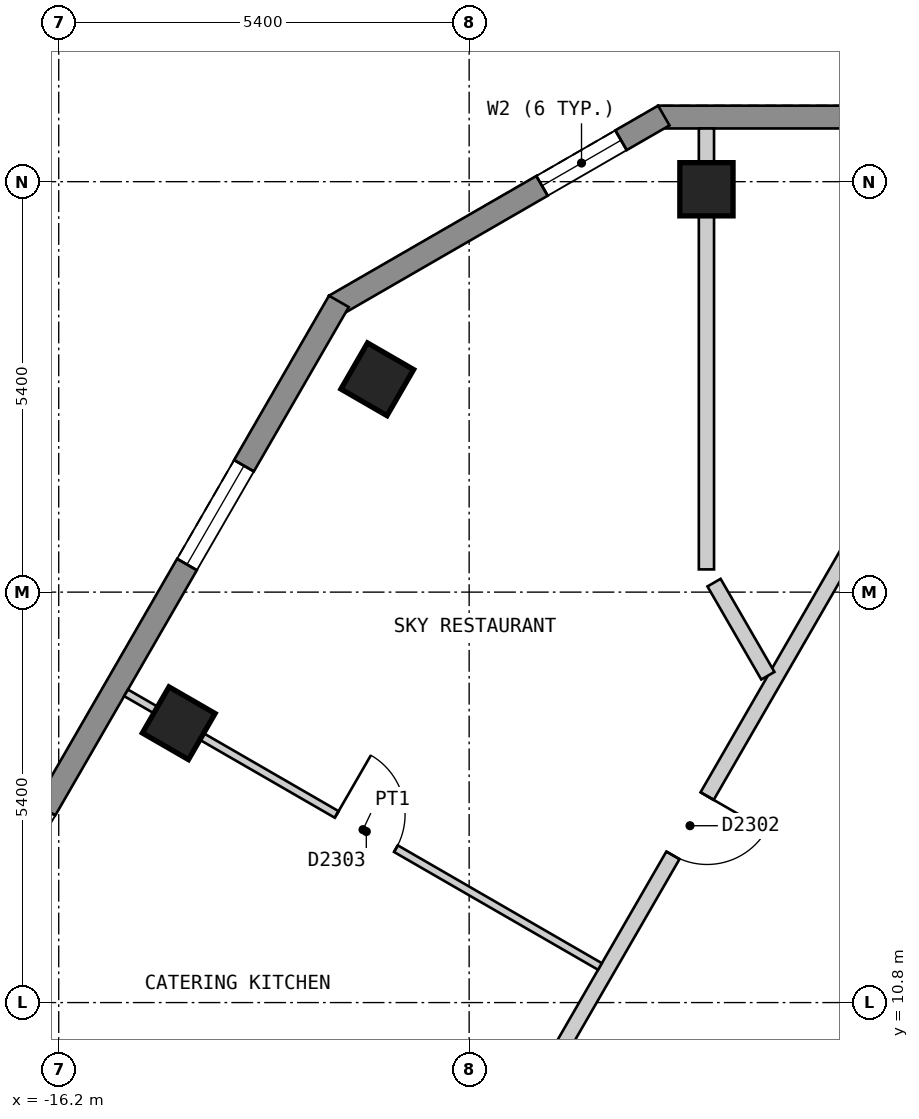
"""IFC4 building model, lengths in metres.
Left out: names, types, materials, properties, quantities, classifications, styles, units other than length and angle.
Written with IfcOpenShell. Run it as: python <this file> out.ifc"""

import sys

from ifc_helpers import new_model, si_unit, direction, frame, frame_2d, origin, origin_2d, place, context, subcontext, project, spatial, polyline, rectangle, outline, extrude, element, fill, save


model = new_model("IFC4")
c1 = context("Model", 3, precision=1e-05, world=origin(), true_north=direction((0.0, 1.0)))
c2 = subcontext(c1, "Body", "Model", "MODEL_VIEW")
j1 = project(units=[si_unit("LENGTHUNIT", "METRE"), si_unit("PLANEANGLEUNIT", "RADIAN")], contexts=[c1])
p1 = place(None, origin())
s1 = spatial("IfcSite", under=j1, at=p1, CompositionType="ELEMENT")
p2 = place(p1, origin())
s2 = spatial("IfcBuilding", under=s1, at=p2, CompositionType="ELEMENT")
p3 = place(p2, frame((0.0, 0.0, 241.8)))
s3 = spatial("IfcBuildingStorey", under=s2, at=p3, CompositionType="ELEMENT", Elevation=241.8)
for number, where, z_axis, x_axis in (
    (1, (-7.678, 21.5, 0.0), (0.0, 0.0, 1.0), (-1.0, 0.0, 0.0)),
    (2, (-12.009, 19.0, 0.0), (0.0, 0.0, 1.0), (-0.5, -0.866, 0.0)),
    (3, (-14.621, 14.475, 0.0), (0.0, 0.0, 1.0), (-0.5, -0.866, 0.0)),
):
    element("IfcColumn", number, at=place(p3, frame(where, z_axis=z_axis, x_axis=x_axis)), inside=s3, PredefinedType="COLUMN", context=c2, shape_type="SweptSolid", body=[
        extrude(rectangle(XDim=0.7, YDim=0.7, at=origin_2d()), origin(), (0.0, 0.0, 1.0), 3.0),
    ])
p4 = place(p3, frame((8.314, 22.45, 0.0), z_axis=(0.0, 0.0, 1.0), x_axis=(-1.0, 0.0, 0.0)))
e4 = element("IfcWall", 4, at=p4, inside=s3, PredefinedType="SOLIDWALL", context=c2, shape_type="SweptSolid", body=[
    extrude(outline(polyline([(0.0, -0.15), (16.628, -0.15), (16.548, 0.15), (0.08, 0.15), (0.0, -0.15)])), origin(), (0.0, 0.0, 1.0), 2.2),
])
p5 = place(p4, frame((2.444, 0.0, 0.15)))
e5 = element("IfcOpeningElement", 5, at=p5, cuts=e4, PredefinedType="OPENING", context=c2, shape_type="SweptSolid", body=[
    extrude(rectangle(XDim=1.5, YDim=2.1, at=frame_2d((0.75, 1.05))), frame((0.0, 0.16, 0.0), z_axis=(0.0, -1.0, 0.0), x_axis=(1.0, 0.0, 0.0)), (0.0, 0.0, 1.0), 0.32),
])
p6 = place(p4, frame((7.564, 0.0, 0.15)))
e6 = element("IfcOpeningElement", 6, at=p6, cuts=e4, PredefinedType="OPENING", context=c2, shape_type="SweptSolid", body=[
    extrude(rectangle(XDim=1.5, YDim=2.1, at=frame_2d((0.75, 1.05))), frame((0.0, 0.16, 0.0), z_axis=(0.0, -1.0, 0.0), x_axis=(1.0, 0.0, 0.0)), (0.0, 0.0, 1.0), 0.32),
])
p7 = place(p4, frame((12.683, 0.0, 0.15)))
e7 = element("IfcOpeningElement", 7, at=p7, cuts=e4, PredefinedType="OPENING", context=c2, shape_type="SweptSolid", body=[
    extrude(rectangle(XDim=1.5, YDim=2.1, at=frame_2d((0.75, 1.05))), frame((0.0, 0.16, 0.0), z_axis=(0.0, -1.0, 0.0), x_axis=(1.0, 0.0, 0.0)), (0.0, 0.0, 1.0), 0.32),
])
p8 = place(p3, frame((-8.239, 22.47, 0.0), z_axis=(0.0, 0.0, 1.0), x_axis=(-0.866022959057, -0.500004234368, 0.0)))
e8 = element("IfcWall", 8, at=p8, inside=s3, PredefinedType="SOLIDWALL", context=c2, shape_type="SweptSolid", body=[
    extrude(outline(polyline([(0.0, -0.15), (5.0, -0.15), (4.92, 0.15), (0.08, 0.15), (0.0, -0.15)])), origin(), (0.0, 0.0, 1.0), 2.2),
])
p9 = place(p8, frame((0.65, 0.0, 0.15)))
e9 = element("IfcOpeningElement", 9, at=p9, cuts=e8, PredefinedType="OPENING", context=c2, shape_type="SweptSolid", body=[
    extrude(rectangle(XDim=1.2, YDim=2.1, at=frame_2d((0.6, 1.05))), frame((0.0, 0.16, 0.0), z_axis=(0.0, -1.0, 0.0), x_axis=(1.0, 0.0, 0.0)), (0.0, 0.0, 1.0), 0.32),
])
p10 = place(p3, frame((-12.514, 20.025, 0.0), z_axis=(0.0, 0.0, 1.0), x_axis=(-0.500003656944, -0.866023292436, 0.0)))
e10 = element("IfcWall", 10, at=p10, inside=s3, PredefinedType="SOLIDWALL", context=c2, shape_type="SweptSolid", body=[
    extrude(outline(polyline([(0.0, -0.15), (22.17, -0.15), (22.09, 0.15), (0.08, 0.15), (0.0, -0.15)])), origin(), (0.0, 0.0, 1.0), 2.2),
])
p11 = place(p10, frame((2.497, 0.0, 0.15)))
e11 = element("IfcOpeningElement", 11, at=p11, cuts=e10, PredefinedType="OPENING", context=c2, shape_type="SweptSolid", body=[
    extrude(rectangle(XDim=1.5, YDim=2.1, at=frame_2d((0.75, 1.05))), frame((0.0, 0.16, 0.0), z_axis=(0.0, -1.0, 0.0), x_axis=(1.0, 0.0, 0.0)), (0.0, 0.0, 1.0), 0.32),
])
p12 = place(p10, frame((7.722, 0.0, 0.15)))
e12 = element("IfcOpeningElement", 12, at=p12, cuts=e10, PredefinedType="OPENING", context=c2, shape_type="SweptSolid", body=[
    extrude(rectangle(XDim=1.5, YDim=2.1, at=frame_2d((0.75, 1.05))), frame((0.0, 0.16, 0.0), z_axis=(0.0, -1.0, 0.0), x_axis=(1.0, 0.0, 0.0)), (0.0, 0.0, 1.0), 0.32),
])
p13 = place(p10, frame((12.948, 0.0, 0.15)))
e13 = element("IfcOpeningElement", 13, at=p13, cuts=e10, PredefinedType="OPENING", context=c2, shape_type="SweptSolid", body=[
    extrude(rectangle(XDim=1.5, YDim=2.1, at=frame_2d((0.75, 1.05))), frame((0.0, 0.16, 0.0), z_axis=(0.0, -1.0, 0.0), x_axis=(1.0, 0.0, 0.0)), (0.0, 0.0, 1.0), 0.32),
])
p14 = place(p10, frame((18.173, 0.0, 0.15)))
e14 = element("IfcOpeningElement", 14, at=p14, cuts=e10, PredefinedType="OPENING", context=c2, shape_type="SweptSolid", body=[
    extrude(rectangle(XDim=1.5, YDim=2.1, at=frame_2d((0.75, 1.05))), frame((0.0, 0.16, 0.0), z_axis=(0.0, -1.0, 0.0), x_axis=(1.0, 0.0, 0.0)), (0.0, 0.0, 1.0), 0.32),
])
p15 = place(p3, frame((-10.854, 8.0, 0.0), z_axis=(0.0, 0.0, 1.0), x_axis=(0.499997637144, 0.866026767976, 0.0)))
e15 = element("IfcWall", 15, at=p15, inside=s3, PredefinedType="PARTITIONING", context=c2, shape_type="SweptSolid", body=[
    extrude(rectangle(XDim=10.854, YDim=0.2, at=frame_2d((5.427, 0.0))), origin(), (0.0, 0.0, 1.0), 2.2),
])
p16 = place(p15, frame((5.47, 0.0, 0.0)))
e16 = element("IfcOpeningElement", 16, at=p16, cuts=e15, PredefinedType="OPENING", context=c2, shape_type="SweptSolid", body=[
    extrude(rectangle(XDim=0.9, YDim=2.1, at=frame_2d((0.45, 1.05))), frame((0.0, 0.11, 0.0), z_axis=(0.0, -1.0, 0.0), x_axis=(1.0, 0.0, 0.0)), (0.0, 0.0, 1.0), 0.22),
])
p17 = place(p3, frame((-15.314, 14.875, 0.0), z_axis=(0.0, 0.0, 1.0), x_axis=(0.866001485781, -0.500041424909, 0.0)))
e17 = element("IfcWall", 17, at=p17, inside=s3, PredefinedType="PARTITIONING", context=c2, shape_type="SweptSolid", body=[
    extrude(rectangle(XDim=7.2, YDim=0.1, at=frame_2d((3.6, 0.0))), origin(), (0.0, 0.0, 1.0), 2.2),
])
p18 = place(p17, frame((3.2, 0.0, 0.0)))
e18 = element("IfcOpeningElement", 18, at=p18, cuts=e17, PredefinedType="OPENING", context=c2, shape_type="SweptSolid", body=[
    extrude(rectangle(XDim=0.9, YDim=2.1, at=frame_2d((0.45, 1.05))), frame((0.0, 0.06, 0.0), z_axis=(0.0, -1.0, 0.0), x_axis=(1.0, 0.0, 0.0)), (0.0, 0.0, 1.0), 0.12),
])
p19 = place(p3, frame((-7.578, 16.325, 0.0), z_axis=(0.0, 0.0, 1.0), x_axis=(0.500314976313, -0.865843475737, 0.0)))
e19 = element("IfcWall", 19, at=p19, inside=s3, PredefinedType="PARTITIONING", context=c2, shape_type="SweptSolid", body=[
    extrude(rectangle(XDim=1.415, YDim=0.2, at=frame_2d((0.707, 0.0))), origin(), (0.0, 0.0, 1.0), 2.2),
])
p20 = place(p3, frame((-17.926, 10.35, 0.0), z_axis=(0.0, 0.0, 1.0), x_axis=(0.866018411306, -0.500012111133, 0.0)))
e20 = element("IfcWall", 20, at=p20, inside=s3, PredefinedType="PARTITIONING", context=c2, shape_type="SweptSolid", body=[
    extrude(rectangle(XDim=9.898, YDim=0.2, at=frame_2d((4.949, 0.0))), origin(), (0.0, 0.0, 1.0), 2.2),
])
p21 = place(p3, frame((-7.678, 16.499, 0.0), z_axis=(0.0, 0.0, 1.0), x_axis=(0.0, 1.0, 0.0)))
e21 = element("IfcWall", 21, at=p21, inside=s3, PredefinedType="PARTITIONING", context=c2, shape_type="SweptSolid", body=[
    extrude(rectangle(XDim=5.801, YDim=0.2, at=frame_2d((2.9, 0.0))), origin(), (0.0, 0.0, 1.0), 2.2),
])
p22 = place(p9, origin())
e22 = element("IfcWindow", 22, at=p22, inside=s3, PartitioningType="SINGLE_PANEL", PredefinedType="WINDOW", context=c2, shape_type="SweptSolid", body=[
    extrude(rectangle(XDim=1.2, YDim=2.1, at=frame_2d((0.6, 1.05))), frame((0.0, 0.03, 0.0), z_axis=(0.0, -1.0, 0.0), x_axis=(1.0, 0.0, 0.0)), (0.0, 0.0, 1.0), 0.06),
])
fill(e9, e22)
p23 = place(p11, origin())
e23 = element("IfcWindow", 23, at=p23, inside=s3, PartitioningType="SINGLE_PANEL", PredefinedType="WINDOW", context=c2, shape_type="SweptSolid", body=[
    extrude(rectangle(XDim=1.5, YDim=2.1, at=frame_2d((0.75, 1.05))), frame((0.0, 0.03, 0.0), z_axis=(0.0, -1.0, 0.0), x_axis=(1.0, 0.0, 0.0)), (0.0, 0.0, 1.0), 0.06),
])
fill(e11, e23)
p24 = place(p16, origin())
e24 = element("IfcDoor", 24, at=p24, inside=s3, OperationType="SINGLE_SWING_RIGHT", PredefinedType="DOOR", context=c2, shape_type="SweptSolid", body=[
    extrude(rectangle(XDim=0.9, YDim=2.1, at=frame_2d((0.45, 1.05))), frame((0.0, 0.025, 0.0), z_axis=(0.0, -1.0, 0.0), x_axis=(1.0, 0.0, 0.0)), (0.0, 0.0, 1.0), 0.05),
])
fill(e16, e24)
p25 = place(p18, origin())
e25 = element("IfcDoor", 25, at=p25, inside=s3, OperationType="SINGLE_SWING_LEFT", PredefinedType="DOOR", context=c2, shape_type="SweptSolid", body=[
    extrude(rectangle(XDim=0.9, YDim=2.1, at=frame_2d((0.45, 1.05))), frame((0.0, 0.025, 0.0), z_axis=(0.0, -1.0, 0.0), x_axis=(1.0, 0.0, 0.0)), (0.0, 0.0, 1.0), 0.05),
])
fill(e18, e25)
save(model, sys.argv[1])
